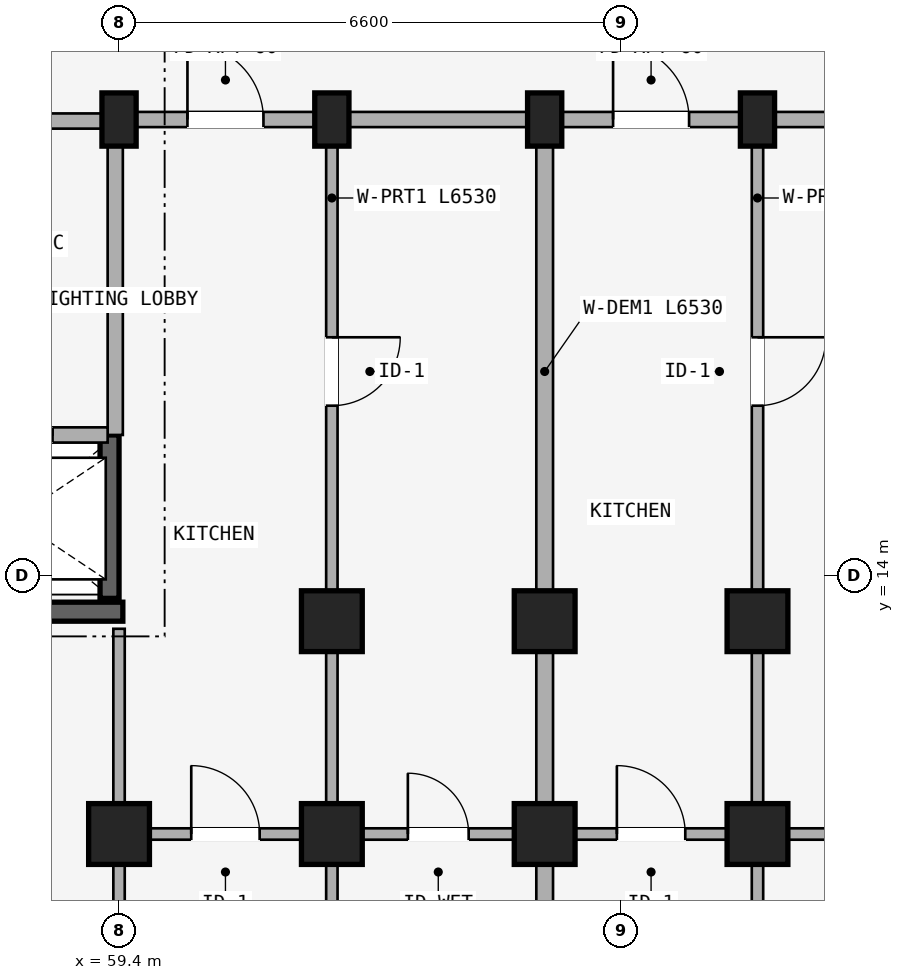
"""IFC4 building model, lengths in metres.
Left out: names, types, materials, properties, quantities, classifications, styles, units other than length and angle.
Written with IfcOpenShell. Run it as: python <this file> out.ifc"""

import sys

from ifc_helpers import new_model, si_unit, direction, frame, frame_2d, origin, origin_2d, place, context, subcontext, project, spatial, rectangle, extrude, element, fill, save


model = new_model("IFC4")
c1 = context("Model", 3, precision=1e-05, world=origin(), true_north=direction((0.0, 1.0)))
c2 = subcontext(c1, "Body", "Model", "MODEL_VIEW")
j1 = project(units=[si_unit("LENGTHUNIT", "METRE"), si_unit("PLANEANGLEUNIT", "RADIAN")], contexts=[c1])
p1 = place(None, origin())
s1 = spatial("IfcSite", under=j1, at=p1, CompositionType="ELEMENT")
p2 = place(p1, origin())
s2 = spatial("IfcBuilding", under=s1, at=p2, CompositionType="ELEMENT")
p3 = place(p2, frame((0.0, 0.0, 15.0)))
s3 = spatial("IfcBuildingStorey", under=s2, at=p3, CompositionType="ELEMENT", Elevation=15.0)
p4 = place(p3, frame((56.65, 13.525, 0.0), z_axis=(0.0, 0.0, 1.0), x_axis=(1.0, 0.0, 0.0)))
e1 = element("IfcWall", 1, at=p4, inside=s3, PredefinedType="SHEAR", context=c2, shape_type="SweptSolid", body=[
    extrude(rectangle(XDim=2.8, YDim=0.25, at=frame_2d((1.4, 0.0))), origin(), (0.0, 0.0, 1.0), 2.93),
])
p5 = place(p3, frame((59.275, 15.85, 0.0), z_axis=(0.0, 0.0, 1.0), x_axis=(0.0, -1.0, 0.0)))
e2 = element("IfcWall", 2, at=p5, inside=s3, PredefinedType="SHEAR", context=c2, shape_type="SweptSolid", body=[
    extrude(rectangle(XDim=2.15, YDim=0.25, at=frame_2d((1.075, 0.0))), origin(), (0.0, 0.0, 1.0), 2.93),
])
p6 = place(p3, frame((59.4, 20.0, 0.0), z_axis=(0.0, 0.0, 1.0), x_axis=(1.0, 0.0, 0.0)))
e3 = element("IfcColumn", 3, at=p6, inside=s3, PredefinedType="COLUMN", context=c2, shape_type="SweptSolid", body=[
    extrude(rectangle(XDim=0.45, YDim=0.7, at=origin_2d()), origin(), (0.0, 0.0, 1.0), 2.93),
])
p7 = place(p3, frame((59.4, 10.6, 0.0), z_axis=(0.0, 0.0, 1.0), x_axis=(1.0, 0.0, 0.0)))
e4 = element("IfcColumn", 4, at=p7, inside=s3, PredefinedType="COLUMN", context=c2, shape_type="SweptSolid", body=[
    extrude(rectangle(XDim=0.8, YDim=0.8, at=origin_2d()), origin(), (0.0, 0.0, 1.0), 2.93),
])
p8 = place(p3, frame((62.2, 20.0, 0.0), z_axis=(0.0, 0.0, 1.0), x_axis=(1.0, 0.0, 0.0)))
e5 = element("IfcColumn", 5, at=p8, inside=s3, PredefinedType="COLUMN", context=c2, shape_type="SweptSolid", body=[
    extrude(rectangle(XDim=0.45, YDim=0.7, at=origin_2d()), origin(), (0.0, 0.0, 1.0), 2.93),
])
for number, where, z_axis, x_axis in (
    (6, (62.2, 13.4, 0.0), (0.0, 0.0, 1.0), (1.0, 0.0, 0.0)),
    (7, (62.2, 10.6, 0.0), (0.0, 0.0, 1.0), (1.0, 0.0, 0.0)),
):
    element("IfcColumn", number, at=place(p3, frame(where, z_axis=z_axis, x_axis=x_axis)), inside=s3, PredefinedType="COLUMN", context=c2, shape_type="SweptSolid", body=[
        extrude(rectangle(XDim=0.8, YDim=0.8, at=origin_2d()), origin(), (0.0, 0.0, 1.0), 2.93),
    ])
p9 = place(p3, frame((65.0, 20.0, 0.0), z_axis=(0.0, 0.0, 1.0), x_axis=(1.0, 0.0, 0.0)))
e8 = element("IfcColumn", 8, at=p9, inside=s3, PredefinedType="COLUMN", context=c2, shape_type="SweptSolid", body=[
    extrude(rectangle(XDim=0.45, YDim=0.7, at=origin_2d()), origin(), (0.0, 0.0, 1.0), 2.93),
])
for number, where, z_axis, x_axis in (
    (9, (65.0, 13.4, 0.0), (0.0, 0.0, 1.0), (1.0, 0.0, 0.0)),
    (10, (65.0, 10.6, 0.0), (0.0, 0.0, 1.0), (1.0, 0.0, 0.0)),
):
    element("IfcColumn", number, at=place(p3, frame(where, z_axis=z_axis, x_axis=x_axis)), inside=s3, PredefinedType="COLUMN", context=c2, shape_type="SweptSolid", body=[
        extrude(rectangle(XDim=0.8, YDim=0.8, at=origin_2d()), origin(), (0.0, 0.0, 1.0), 2.93),
    ])
p10 = place(p3, frame((67.8, 20.0, 0.0), z_axis=(0.0, 0.0, 1.0), x_axis=(1.0, 0.0, 0.0)))
e11 = element("IfcColumn", 11, at=p10, inside=s3, PredefinedType="COLUMN", context=c2, shape_type="SweptSolid", body=[
    extrude(rectangle(XDim=0.45, YDim=0.7, at=origin_2d()), origin(), (0.0, 0.0, 1.0), 2.93),
])
for number, where, z_axis, x_axis in (
    (12, (67.8, 13.4, 0.0), (0.0, 0.0, 1.0), (1.0, 0.0, 0.0)),
    (13, (67.8, 10.6, 0.0), (0.0, 0.0, 1.0), (1.0, 0.0, 0.0)),
):
    element("IfcColumn", number, at=place(p3, frame(where, z_axis=z_axis, x_axis=x_axis)), inside=s3, PredefinedType="COLUMN", context=c2, shape_type="SweptSolid", body=[
        extrude(rectangle(XDim=0.8, YDim=0.8, at=origin_2d()), origin(), (0.0, 0.0, 1.0), 2.93),
    ])
p11 = place(p3, frame((53.7, 19.98, 0.0), z_axis=(0.0, 0.0, 1.0), x_axis=(1.0, 0.0, 0.0)))
e14 = element("IfcWall", 14, at=p11, inside=s3, PredefinedType="STANDARD", context=c2, shape_type="SweptSolid", body=[
    extrude(rectangle(XDim=5.65, YDim=0.2, at=frame_2d((2.825, 0.0))), origin(), (0.0, 0.0, 1.0), 2.372),
])
p12 = place(p11, frame((1.923, 0.0, 0.0)))
e15 = element("IfcOpeningElement", 15, at=p12, cuts=e14, PredefinedType="OPENING", context=c2, shape_type="SweptSolid", body=[
    extrude(rectangle(XDim=1.24, YDim=2.15, at=frame_2d((0.62, 1.075))), frame((0.0, 0.11, 0.0), z_axis=(0.0, -1.0, 0.0), x_axis=(1.0, 0.0, 0.0)), (0.0, 0.0, 1.0), 0.22),
])
p13 = place(p3, frame((59.35, 19.98, 0.0), z_axis=(0.0, 0.0, 1.0), x_axis=(0.0, -1.0, 0.0)))
e16 = element("IfcWall", 16, at=p13, inside=s3, PredefinedType="STANDARD", context=c2, shape_type="SweptSolid", body=[
    extrude(rectangle(XDim=4.13, YDim=0.2, at=frame_2d((2.065, 0.0))), origin(), (0.0, 0.0, 1.0), 2.372),
])
p14 = place(p3, frame((56.7, 15.85, 0.0), z_axis=(0.0, 0.0, 1.0), x_axis=(1.0, 0.0, 0.0)))
e17 = element("IfcWall", 17, at=p14, inside=s3, PredefinedType="STANDARD", context=c2, shape_type="SweptSolid", body=[
    extrude(rectangle(XDim=2.55, YDim=0.2, at=frame_2d((1.275, 0.0))), origin(), (0.0, 0.0, 1.0), 2.372),
])
p15 = place(p14, frame((0.725, 0.0, 0.0)))
e18 = element("IfcOpeningElement", 18, at=p15, cuts=e17, PredefinedType="OPENING", context=c2, shape_type="SweptSolid", body=[
    extrude(rectangle(XDim=1.1, YDim=2.15, at=frame_2d((0.55, 1.075))), frame((0.0, 0.11, 0.0), z_axis=(0.0, -1.0, 0.0), x_axis=(1.0, 0.0, 0.0)), (0.0, 0.0, 1.0), 0.22),
])
p16 = place(p3, frame((59.4, 20.0, 0.0), z_axis=(0.0, 0.0, 1.0), x_axis=(1.0, 0.0, 0.0)))
e19 = element("IfcWall", 19, at=p16, inside=s3, PredefinedType="STANDARD", context=c2, shape_type="SweptSolid", body=[
    extrude(rectangle(XDim=2.8, YDim=0.2, at=frame_2d((1.4, 0.0))), origin(), (0.0, 0.0, 1.0), 2.372),
])
p17 = place(p16, frame((0.9, 0.0, 0.0)))
e20 = element("IfcOpeningElement", 20, at=p17, cuts=e19, PredefinedType="OPENING", context=c2, shape_type="SweptSolid", body=[
    extrude(rectangle(XDim=1.0, YDim=2.15, at=frame_2d((0.5, 1.075))), frame((0.0, 0.11, 0.0), z_axis=(0.0, -1.0, 0.0), x_axis=(1.0, 0.0, 0.0)), (0.0, 0.0, 1.0), 0.22),
])
p18 = place(p3, frame((59.48, 10.6, 0.0), z_axis=(0.0, 0.0, 1.0), x_axis=(1.0, 0.0, 0.0)))
e21 = element("IfcWall", 21, at=p18, inside=s3, PredefinedType="PLUMBINGWALL", context=c2, shape_type="SweptSolid", body=[
    extrude(rectangle(XDim=2.64, YDim=0.15, at=frame_2d((1.32, 0.0))), origin(), (0.0, 0.0, 1.0), 2.372),
])
p19 = place(p18, frame((0.87, 0.0, 0.0)))
e22 = element("IfcOpeningElement", 22, at=p19, cuts=e21, PredefinedType="OPENING", context=c2, shape_type="SweptSolid", body=[
    extrude(rectangle(XDim=0.9, YDim=2.1, at=frame_2d((0.45, 1.05))), frame((0.0, 0.085, 0.0), z_axis=(0.0, -1.0, 0.0), x_axis=(1.0, 0.0, 0.0)), (0.0, 0.0, 1.0), 0.17),
])
p20 = place(p3, frame((62.2, 20.0, 0.0), z_axis=(0.0, 0.0, 1.0), x_axis=(1.0, 0.0, 0.0)))
e23 = element("IfcWall", 23, at=p20, inside=s3, PredefinedType="STANDARD", context=c2, shape_type="SweptSolid", body=[
    extrude(rectangle(XDim=2.8, YDim=0.2, at=frame_2d((1.4, 0.0))), origin(), (0.0, 0.0, 1.0), 2.372),
])
p21 = place(p3, frame((62.28, 10.6, 0.0), z_axis=(0.0, 0.0, 1.0), x_axis=(1.0, 0.0, 0.0)))
e24 = element("IfcWall", 24, at=p21, inside=s3, PredefinedType="PLUMBINGWALL", context=c2, shape_type="SweptSolid", body=[
    extrude(rectangle(XDim=2.64, YDim=0.15, at=frame_2d((1.32, 0.0))), origin(), (0.0, 0.0, 1.0), 2.372),
])
p22 = place(p21, frame((0.92, 0.0, 0.0)))
e25 = element("IfcOpeningElement", 25, at=p22, cuts=e24, PredefinedType="OPENING", context=c2, shape_type="SweptSolid", body=[
    extrude(rectangle(XDim=0.8, YDim=2.1, at=frame_2d((0.4, 1.05))), frame((0.0, 0.085, 0.0), z_axis=(0.0, -1.0, 0.0), x_axis=(1.0, 0.0, 0.0)), (0.0, 0.0, 1.0), 0.17),
])
p23 = place(p3, frame((65.0, 20.0, 0.0), z_axis=(0.0, 0.0, 1.0), x_axis=(1.0, 0.0, 0.0)))
e26 = element("IfcWall", 26, at=p23, inside=s3, PredefinedType="STANDARD", context=c2, shape_type="SweptSolid", body=[
    extrude(rectangle(XDim=2.8, YDim=0.2, at=frame_2d((1.4, 0.0))), origin(), (0.0, 0.0, 1.0), 2.372),
])
p24 = place(p23, frame((0.9, 0.0, 0.0)))
e27 = element("IfcOpeningElement", 27, at=p24, cuts=e26, PredefinedType="OPENING", context=c2, shape_type="SweptSolid", body=[
    extrude(rectangle(XDim=1.0, YDim=2.15, at=frame_2d((0.5, 1.075))), frame((0.0, 0.11, 0.0), z_axis=(0.0, -1.0, 0.0), x_axis=(1.0, 0.0, 0.0)), (0.0, 0.0, 1.0), 0.22),
])
p25 = place(p3, frame((65.08, 10.6, 0.0), z_axis=(0.0, 0.0, 1.0), x_axis=(1.0, 0.0, 0.0)))
e28 = element("IfcWall", 28, at=p25, inside=s3, PredefinedType="PLUMBINGWALL", context=c2, shape_type="SweptSolid", body=[
    extrude(rectangle(XDim=2.64, YDim=0.15, at=frame_2d((1.32, 0.0))), origin(), (0.0, 0.0, 1.0), 2.372),
])
p26 = place(p25, frame((0.87, 0.0, 0.0)))
e29 = element("IfcOpeningElement", 29, at=p26, cuts=e28, PredefinedType="OPENING", context=c2, shape_type="SweptSolid", body=[
    extrude(rectangle(XDim=0.9, YDim=2.1, at=frame_2d((0.45, 1.05))), frame((0.0, 0.085, 0.0), z_axis=(0.0, -1.0, 0.0), x_axis=(1.0, 0.0, 0.0)), (0.0, 0.0, 1.0), 0.17),
])
p27 = place(p3, frame((67.8, 20.0, 0.0), z_axis=(0.0, 0.0, 1.0), x_axis=(1.0, 0.0, 0.0)))
e30 = element("IfcWall", 30, at=p27, inside=s3, PredefinedType="STANDARD", context=c2, shape_type="SweptSolid", body=[
    extrude(rectangle(XDim=2.8, YDim=0.2, at=frame_2d((1.4, 0.0))), origin(), (0.0, 0.0, 1.0), 2.372),
])
p28 = place(p3, frame((67.88, 10.6, 0.0), z_axis=(0.0, 0.0, 1.0), x_axis=(1.0, 0.0, 0.0)))
e31 = element("IfcWall", 31, at=p28, inside=s3, PredefinedType="PLUMBINGWALL", context=c2, shape_type="SweptSolid", body=[
    extrude(rectangle(XDim=2.64, YDim=0.15, at=frame_2d((1.32, 0.0))), origin(), (0.0, 0.0, 1.0), 2.372),
])
p29 = place(p28, frame((0.92, 0.0, 0.0)))
e32 = element("IfcOpeningElement", 32, at=p29, cuts=e31, PredefinedType="OPENING", context=c2, shape_type="SweptSolid", body=[
    extrude(rectangle(XDim=0.8, YDim=2.1, at=frame_2d((0.4, 1.05))), frame((0.0, 0.085, 0.0), z_axis=(0.0, -1.0, 0.0), x_axis=(1.0, 0.0, 0.0)), (0.0, 0.0, 1.0), 0.17),
])
p30 = place(p3, frame((59.4, 13.3, 0.0), z_axis=(0.0, 0.0, 1.0), x_axis=(0.0, -1.0, 0.0)))
e33 = element("IfcWall", 33, at=p30, inside=s3, PredefinedType="PARTITIONING", context=c2, shape_type="SweptSolid", body=[
    extrude(rectangle(XDim=10.82, YDim=0.15, at=frame_2d((5.41, 0.0))), origin(), (0.0, 0.0, 1.0), 2.372),
])
p31 = place(p30, frame((3.7, 0.0, 0.0)))
e34 = element("IfcOpeningElement", 34, at=p31, cuts=e33, PredefinedType="OPENING", context=c2, shape_type="SweptSolid", body=[
    extrude(rectangle(XDim=0.8, YDim=2.1, at=frame_2d((0.4, 1.05))), frame((0.0, 0.085, 0.0), z_axis=(0.0, -1.0, 0.0), x_axis=(1.0, 0.0, 0.0)), (0.0, 0.0, 1.0), 0.17),
])
p32 = place(p3, frame((62.2, 19.95, 0.0), z_axis=(0.0, 0.0, 1.0), x_axis=(0.0, -1.0, 0.0)))
e35 = element("IfcWall", 35, at=p32, inside=s3, PredefinedType="PARTITIONING", context=c2, shape_type="SweptSolid", body=[
    extrude(rectangle(XDim=6.53, YDim=0.15, at=frame_2d((3.265, 0.0))), origin(), (0.0, 0.0, 1.0), 2.372),
])
p33 = place(p32, frame((2.815, 0.0, 0.0)))
e36 = element("IfcOpeningElement", 36, at=p33, cuts=e35, PredefinedType="OPENING", context=c2, shape_type="SweptSolid", body=[
    extrude(rectangle(XDim=0.9, YDim=2.1, at=frame_2d((0.45, 1.05))), frame((0.0, 0.085, 0.0), z_axis=(0.0, -1.0, 0.0), x_axis=(1.0, 0.0, 0.0)), (0.0, 0.0, 1.0), 0.17),
])
p34 = place(p3, frame((62.2, 13.3, 0.0), z_axis=(0.0, 0.0, 1.0), x_axis=(0.0, -1.0, 0.0)))
e37 = element("IfcWall", 37, at=p34, inside=s3, PredefinedType="PARTITIONING", context=c2, shape_type="SweptSolid", body=[
    extrude(rectangle(XDim=10.82, YDim=0.15, at=frame_2d((5.41, 0.0))), origin(), (0.0, 0.0, 1.0), 2.372),
])
p35 = place(p34, frame((3.7, 0.0, 0.0)))
e38 = element("IfcOpeningElement", 38, at=p35, cuts=e37, PredefinedType="OPENING", context=c2, shape_type="SweptSolid", body=[
    extrude(rectangle(XDim=0.8, YDim=2.1, at=frame_2d((0.4, 1.05))), frame((0.0, 0.085, 0.0), z_axis=(0.0, -1.0, 0.0), x_axis=(1.0, 0.0, 0.0)), (0.0, 0.0, 1.0), 0.17),
])
p36 = place(p3, frame((65.0, 19.95, 0.0), z_axis=(0.0, 0.0, 1.0), x_axis=(0.0, -1.0, 0.0)))
e39 = element("IfcWall", 39, at=p36, inside=s3, PredefinedType="STANDARD", context=c2, shape_type="SweptSolid", body=[
    extrude(rectangle(XDim=6.53, YDim=0.22, at=frame_2d((3.265, 0.0))), origin(), (0.0, 0.0, 1.0), 2.372),
])
p37 = place(p3, frame((65.0, 13.3, 0.0), z_axis=(0.0, 0.0, 1.0), x_axis=(0.0, -1.0, 0.0)))
e40 = element("IfcWall", 40, at=p37, inside=s3, PredefinedType="STANDARD", context=c2, shape_type="SweptSolid", body=[
    extrude(rectangle(XDim=10.82, YDim=0.22, at=frame_2d((5.41, 0.0))), origin(), (0.0, 0.0, 1.0), 2.372),
])
p38 = place(p3, frame((67.8, 19.95, 0.0), z_axis=(0.0, 0.0, 1.0), x_axis=(0.0, -1.0, 0.0)))
e41 = element("IfcWall", 41, at=p38, inside=s3, PredefinedType="PARTITIONING", context=c2, shape_type="SweptSolid", body=[
    extrude(rectangle(XDim=6.53, YDim=0.15, at=frame_2d((3.265, 0.0))), origin(), (0.0, 0.0, 1.0), 2.372),
])
p39 = place(p38, frame((2.815, 0.0, 0.0)))
e42 = element("IfcOpeningElement", 42, at=p39, cuts=e41, PredefinedType="OPENING", context=c2, shape_type="SweptSolid", body=[
    extrude(rectangle(XDim=0.9, YDim=2.1, at=frame_2d((0.45, 1.05))), frame((0.0, 0.085, 0.0), z_axis=(0.0, -1.0, 0.0), x_axis=(1.0, 0.0, 0.0)), (0.0, 0.0, 1.0), 0.17),
])
p40 = place(p3, frame((67.8, 13.3, 0.0), z_axis=(0.0, 0.0, 1.0), x_axis=(0.0, -1.0, 0.0)))
e43 = element("IfcWall", 43, at=p40, inside=s3, PredefinedType="PARTITIONING", context=c2, shape_type="SweptSolid", body=[
    extrude(rectangle(XDim=10.82, YDim=0.15, at=frame_2d((5.41, 0.0))), origin(), (0.0, 0.0, 1.0), 2.372),
])
p41 = place(p40, frame((3.7, 0.0, 0.0)))
e44 = element("IfcOpeningElement", 44, at=p41, cuts=e43, PredefinedType="OPENING", context=c2, shape_type="SweptSolid", body=[
    extrude(rectangle(XDim=0.8, YDim=2.1, at=frame_2d((0.4, 1.05))), frame((0.0, 0.085, 0.0), z_axis=(0.0, -1.0, 0.0), x_axis=(1.0, 0.0, 0.0)), (0.0, 0.0, 1.0), 0.17),
])
p42 = place(p15, origin())
e45 = element("IfcDoor", 45, at=p42, inside=s3, OperationType="SLIDING_TO_LEFT", PredefinedType="DOOR", context=c2, shape_type="SweptSolid", body=[
    extrude(rectangle(XDim=1.1, YDim=2.15, at=frame_2d((0.55, 1.075))), frame((0.0, 0.025, 0.0), z_axis=(0.0, -1.0, 0.0), x_axis=(1.0, 0.0, 0.0)), (0.0, 0.0, 1.0), 0.05),
])
fill(e18, e45)
p43 = place(p19, origin())
e46 = element("IfcDoor", 46, at=p43, inside=s3, OperationType="SINGLE_SWING_LEFT", PredefinedType="DOOR", context=c2, shape_type="SweptSolid", body=[
    extrude(rectangle(XDim=0.9, YDim=2.1, at=frame_2d((0.45, 1.05))), frame((0.0, 0.025, 0.0), z_axis=(0.0, -1.0, 0.0), x_axis=(1.0, 0.0, 0.0)), (0.0, 0.0, 1.0), 0.05),
])
fill(e22, e46)
p44 = place(p17, frame((1.0, 0.0, 0.0), z_axis=(0.0, 0.0, 1.0), x_axis=(-1.0, 0.0, 0.0)))
e47 = element("IfcDoor", 47, at=p44, inside=s3, OperationType="SINGLE_SWING_RIGHT", PredefinedType="DOOR", context=c2, shape_type="SweptSolid", body=[
    extrude(rectangle(XDim=1.0, YDim=2.15, at=frame_2d((0.5, 1.075))), frame((0.0, 0.025, 0.0), z_axis=(0.0, -1.0, 0.0), x_axis=(1.0, 0.0, 0.0)), (0.0, 0.0, 1.0), 0.05),
])
fill(e20, e47)
p45 = place(p22, origin())
e48 = element("IfcDoor", 48, at=p45, inside=s3, OperationType="SINGLE_SWING_LEFT", PredefinedType="DOOR", context=c2, shape_type="SweptSolid", body=[
    extrude(rectangle(XDim=0.8, YDim=2.1, at=frame_2d((0.4, 1.05))), frame((0.0, 0.025, 0.0), z_axis=(0.0, -1.0, 0.0), x_axis=(1.0, 0.0, 0.0)), (0.0, 0.0, 1.0), 0.05),
])
fill(e25, e48)
p46 = place(p26, origin())
e49 = element("IfcDoor", 49, at=p46, inside=s3, OperationType="SINGLE_SWING_LEFT", PredefinedType="DOOR", context=c2, shape_type="SweptSolid", body=[
    extrude(rectangle(XDim=0.9, YDim=2.1, at=frame_2d((0.45, 1.05))), frame((0.0, 0.025, 0.0), z_axis=(0.0, -1.0, 0.0), x_axis=(1.0, 0.0, 0.0)), (0.0, 0.0, 1.0), 0.05),
])
fill(e29, e49)
p47 = place(p24, frame((1.0, 0.0, 0.0), z_axis=(0.0, 0.0, 1.0), x_axis=(-1.0, 0.0, 0.0)))
e50 = element("IfcDoor", 50, at=p47, inside=s3, OperationType="SINGLE_SWING_RIGHT", PredefinedType="DOOR", context=c2, shape_type="SweptSolid", body=[
    extrude(rectangle(XDim=1.0, YDim=2.15, at=frame_2d((0.5, 1.075))), frame((0.0, 0.025, 0.0), z_axis=(0.0, -1.0, 0.0), x_axis=(1.0, 0.0, 0.0)), (0.0, 0.0, 1.0), 0.05),
])
fill(e27, e50)
p48 = place(p33, frame((0.9, 0.0, 0.0), z_axis=(0.0, 0.0, 1.0), x_axis=(-1.0, 0.0, 0.0)))
e51 = element("IfcDoor", 51, at=p48, inside=s3, OperationType="SINGLE_SWING_RIGHT", PredefinedType="DOOR", context=c2, shape_type="SweptSolid", body=[
    extrude(rectangle(XDim=0.9, YDim=2.1, at=frame_2d((0.45, 1.05))), frame((0.0, 0.025, 0.0), z_axis=(0.0, -1.0, 0.0), x_axis=(1.0, 0.0, 0.0)), (0.0, 0.0, 1.0), 0.05),
])
fill(e36, e51)
p49 = place(p39, origin())
e52 = element("IfcDoor", 52, at=p49, inside=s3, OperationType="SINGLE_SWING_LEFT", PredefinedType="DOOR", context=c2, shape_type="SweptSolid", body=[
    extrude(rectangle(XDim=0.9, YDim=2.1, at=frame_2d((0.45, 1.05))), frame((0.0, 0.025, 0.0), z_axis=(0.0, -1.0, 0.0), x_axis=(1.0, 0.0, 0.0)), (0.0, 0.0, 1.0), 0.05),
])
fill(e42, e52)
save(model, sys.argv[1])
